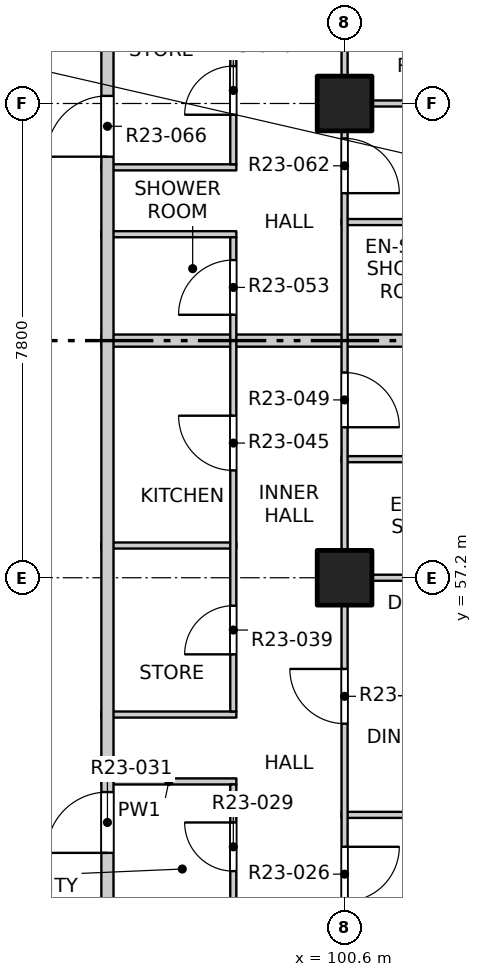
"""IFC4 building model, lengths in metres.
Left out: names, types, materials, properties, quantities, classifications, styles, units other than length and angle.
Written with IfcOpenShell. Run it as: python <this file> out.ifc"""

import sys

from ifc_helpers import new_model, si_unit, direction, frame, frame_2d, origin, origin_2d, place, context, subcontext, project, spatial, rectangle, extrude, element, fill, save


model = new_model("IFC4")
c1 = context("Model", 3, precision=1e-05, world=origin(), true_north=direction((0.0, 1.0)))
c2 = subcontext(c1, "Body", "Model", "MODEL_VIEW")
j1 = project(units=[si_unit("LENGTHUNIT", "METRE"), si_unit("PLANEANGLEUNIT", "RADIAN")], contexts=[c1])
p1 = place(None, origin())
s1 = spatial("IfcSite", under=j1, at=p1, CompositionType="ELEMENT")
p2 = place(p1, origin())
s2 = spatial("IfcBuilding", under=s1, at=p2, CompositionType="ELEMENT")
p3 = place(p2, frame((0.0, 0.0, 238.1)))
s3 = spatial("IfcBuildingStorey", under=s2, at=p3, CompositionType="ELEMENT", Elevation=238.1)
for number, where, z_axis, x_axis in (
    (1, (100.6, 57.2, -0.25), (0.0, 0.0, 1.0), (1.0, 0.0, 0.0)),
    (2, (100.6, 65.0, -0.25), (0.0, 0.0, 1.0), (1.0, 0.0, 0.0)),
):
    element("IfcColumn", number, at=place(p3, frame(where, z_axis=z_axis, x_axis=x_axis)), inside=s3, PredefinedType="COLUMN", context=c2, shape_type="SweptSolid", body=[
        extrude(rectangle(XDim=0.9, YDim=0.9, at=origin_2d()), origin(), (0.0, 0.0, 1.0), 3.35),
    ])
p4 = place(p3, frame((100.55, 53.3, 0.0), z_axis=(0.0, 0.0, 1.0), x_axis=(1.0, 0.0, 0.0)))
e3 = element("IfcWall", 3, at=p4, inside=s3, PredefinedType="PARTITIONING", context=c2, shape_type="SweptSolid", body=[
    extrude(rectangle(XDim=7.55, YDim=0.1, at=frame_2d((3.775, 0.0))), origin(), (0.0, 0.0, 1.0), 3.1),
])
for number, where, z_axis, x_axis in (
    (4, (96.6, 53.85, 0.0), (0.0, 0.0, 1.0), (1.0, 0.0, 0.0)),
    (5, (96.6, 54.95, 0.0), (0.0, 0.0, 1.0), (1.0, 0.0, 0.0)),
):
    element("IfcWall", number, at=place(p3, frame(where, z_axis=z_axis, x_axis=x_axis)), inside=s3, PredefinedType="PARTITIONING", context=c2, shape_type="SweptSolid", body=[
        extrude(rectangle(XDim=2.22, YDim=0.1, at=frame_2d((1.11, 0.0))), origin(), (0.0, 0.0, 1.0), 3.1),
    ])
p5 = place(p3, frame((100.55, 57.2, 0.0), z_axis=(0.0, 0.0, 1.0), x_axis=(1.0, 0.0, 0.0)))
e6 = element("IfcWall", 6, at=p5, inside=s3, PredefinedType="PARTITIONING", context=c2, shape_type="SweptSolid", body=[
    extrude(rectangle(XDim=7.55, YDim=0.1, at=frame_2d((3.775, 0.0))), origin(), (0.0, 0.0, 1.0), 3.1),
])
p6 = place(p3, frame((96.6, 57.73, 0.0), z_axis=(0.0, 0.0, 1.0), x_axis=(1.0, 0.0, 0.0)))
e7 = element("IfcWall", 7, at=p6, inside=s3, PredefinedType="PARTITIONING", context=c2, shape_type="SweptSolid", body=[
    extrude(rectangle(XDim=2.22, YDim=0.1, at=frame_2d((1.11, 0.0))), origin(), (0.0, 0.0, 1.0), 3.1),
])
p7 = place(p3, frame((100.55, 59.15, 0.0), z_axis=(0.0, 0.0, 1.0), x_axis=(1.0, 0.0, 0.0)))
e8 = element("IfcWall", 8, at=p7, inside=s3, PredefinedType="PARTITIONING", context=c2, shape_type="SweptSolid", body=[
    extrude(rectangle(XDim=3.7, YDim=0.1, at=frame_2d((1.85, 0.0))), origin(), (0.0, 0.0, 1.0), 3.1),
])
p8 = place(p3, frame((96.6, 61.1, 0.0), z_axis=(0.0, 0.0, 1.0), x_axis=(1.0, 0.0, 0.0)))
e9 = element("IfcWall", 9, at=p8, inside=s3, PredefinedType="PARTITIONING", context=c2, shape_type="SweptSolid", body=[
    extrude(rectangle(XDim=11.5, YDim=0.2, at=frame_2d((5.75, 0.0))), origin(), (0.0, 0.0, 1.0), 3.1),
])
p9 = place(p3, frame((96.6, 62.85, 0.0), z_axis=(0.0, 0.0, 1.0), x_axis=(1.0, 0.0, 0.0)))
e10 = element("IfcWall", 10, at=p9, inside=s3, PredefinedType="PARTITIONING", context=c2, shape_type="SweptSolid", body=[
    extrude(rectangle(XDim=2.22, YDim=0.1, at=frame_2d((1.11, 0.0))), origin(), (0.0, 0.0, 1.0), 3.1),
])
p10 = place(p3, frame((100.55, 63.05, 0.0), z_axis=(0.0, 0.0, 1.0), x_axis=(1.0, 0.0, 0.0)))
e11 = element("IfcWall", 11, at=p10, inside=s3, PredefinedType="PARTITIONING", context=c2, shape_type="SweptSolid", body=[
    extrude(rectangle(XDim=3.4, YDim=0.1, at=frame_2d((1.7, 0.0))), origin(), (0.0, 0.0, 1.0), 3.1),
])
p11 = place(p3, frame((96.6, 63.95, 0.0), z_axis=(0.0, 0.0, 1.0), x_axis=(1.0, 0.0, 0.0)))
e12 = element("IfcWall", 12, at=p11, inside=s3, PredefinedType="PARTITIONING", context=c2, shape_type="SweptSolid", body=[
    extrude(rectangle(XDim=2.22, YDim=0.1, at=frame_2d((1.11, 0.0))), origin(), (0.0, 0.0, 1.0), 3.1),
])
p12 = place(p3, frame((100.55, 65.0, 0.0), z_axis=(0.0, 0.0, 1.0), x_axis=(1.0, 0.0, 0.0)))
e13 = element("IfcWall", 13, at=p12, inside=s3, PredefinedType="PARTITIONING", context=c2, shape_type="SweptSolid", body=[
    extrude(rectangle(XDim=7.55, YDim=0.1, at=frame_2d((3.775, 0.0))), origin(), (0.0, 0.0, 1.0), 3.1),
])
p13 = place(p3, frame((96.7, 49.5, 0.0), z_axis=(0.0, 0.0, 1.0), x_axis=(0.0, 1.0, 0.0)))
e14 = element("IfcWall", 14, at=p13, inside=s3, PredefinedType="PARTITIONING", context=c2, shape_type="SweptSolid", body=[
    extrude(rectangle(XDim=34.9, YDim=0.2, at=frame_2d((17.45, 0.0))), origin(), (0.0, 0.0, 1.0), 3.1),
])
p14 = place(p13, frame((3.175, 0.0, 0.0)))
e15 = element("IfcOpeningElement", 15, at=p14, cuts=e14, PredefinedType="OPENING", context=c2, shape_type="SweptSolid", body=[
    extrude(rectangle(XDim=1.0, YDim=2.1, at=frame_2d((0.5, 1.05))), frame((0.0, 0.11, 0.0), z_axis=(0.0, -1.0, 0.0), x_axis=(1.0, 0.0, 0.0)), (0.0, 0.0, 1.0), 0.22),
])
p15 = place(p13, frame((14.625, 0.0, 0.0)))
e16 = element("IfcOpeningElement", 16, at=p15, cuts=e14, PredefinedType="OPENING", context=c2, shape_type="SweptSolid", body=[
    extrude(rectangle(XDim=1.0, YDim=2.1, at=frame_2d((0.5, 1.05))), frame((0.0, 0.11, 0.0), z_axis=(0.0, -1.0, 0.0), x_axis=(1.0, 0.0, 0.0)), (0.0, 0.0, 1.0), 0.22),
])
p16 = place(p13, frame((30.175, 0.0, 0.0)))
e17 = element("IfcOpeningElement", 17, at=p16, cuts=e14, PredefinedType="OPENING", context=c2, shape_type="SweptSolid", body=[
    extrude(rectangle(XDim=1.0, YDim=2.1, at=frame_2d((0.5, 1.05))), frame((0.0, 0.11, 0.0), z_axis=(0.0, -1.0, 0.0), x_axis=(1.0, 0.0, 0.0)), (0.0, 0.0, 1.0), 0.22),
])
p17 = place(p3, frame((98.77, 45.55, 0.0), z_axis=(0.0, 0.0, 1.0), x_axis=(0.0, 1.0, 0.0)))
e18 = element("IfcWall", 18, at=p17, inside=s3, PredefinedType="PARTITIONING", context=c2, shape_type="SweptSolid", body=[
    extrude(rectangle(XDim=8.25, YDim=0.1, at=frame_2d((4.125, 0.0))), origin(), (0.0, 0.0, 1.0), 3.1),
])
p18 = place(p17, frame((0.625, 0.0, 0.0)))
e19 = element("IfcOpeningElement", 19, at=p18, cuts=e18, PredefinedType="OPENING", context=c2, shape_type="SweptSolid", body=[
    extrude(rectangle(XDim=0.8, YDim=2.1, at=frame_2d((0.4, 1.05))), frame((0.0, 0.06, 0.0), z_axis=(0.0, -1.0, 0.0), x_axis=(1.0, 0.0, 0.0)), (0.0, 0.0, 1.0), 0.12),
])
p19 = place(p17, frame((2.55, 0.0, 0.0)))
e20 = element("IfcOpeningElement", 20, at=p19, cuts=e18, PredefinedType="OPENING", context=c2, shape_type="SweptSolid", body=[
    extrude(rectangle(XDim=0.9, YDim=2.1, at=frame_2d((0.45, 1.05))), frame((0.0, 0.06, 0.0), z_axis=(0.0, -1.0, 0.0), x_axis=(1.0, 0.0, 0.0)), (0.0, 0.0, 1.0), 0.12),
])
p20 = place(p17, frame((4.575, 0.0, 0.0)))
e21 = element("IfcOpeningElement", 21, at=p20, cuts=e18, PredefinedType="OPENING", context=c2, shape_type="SweptSolid", body=[
    extrude(rectangle(XDim=0.9, YDim=2.1, at=frame_2d((0.45, 1.05))), frame((0.0, 0.06, 0.0), z_axis=(0.0, -1.0, 0.0), x_axis=(1.0, 0.0, 0.0)), (0.0, 0.0, 1.0), 0.12),
])
p21 = place(p17, frame((6.825, 0.0, 0.0)))
e22 = element("IfcOpeningElement", 22, at=p21, cuts=e18, PredefinedType="OPENING", context=c2, shape_type="SweptSolid", body=[
    extrude(rectangle(XDim=0.8, YDim=2.1, at=frame_2d((0.4, 1.05))), frame((0.0, 0.06, 0.0), z_axis=(0.0, -1.0, 0.0), x_axis=(1.0, 0.0, 0.0)), (0.0, 0.0, 1.0), 0.12),
])
p22 = place(p3, frame((98.77, 55.0, 0.0), z_axis=(0.0, 0.0, 1.0), x_axis=(0.0, 1.0, 0.0)))
e23 = element("IfcWall", 23, at=p22, inside=s3, PredefinedType="PARTITIONING", context=c2, shape_type="SweptSolid", body=[
    extrude(rectangle(XDim=7.8, YDim=0.1, at=frame_2d((3.9, 0.0))), origin(), (0.0, 0.0, 1.0), 3.1),
])
p23 = place(p22, frame((0.94, 0.0, 0.0)))
e24 = element("IfcOpeningElement", 24, at=p23, cuts=e23, PredefinedType="OPENING", context=c2, shape_type="SweptSolid", body=[
    extrude(rectangle(XDim=0.8, YDim=2.1, at=frame_2d((0.4, 1.05))), frame((0.0, 0.06, 0.0), z_axis=(0.0, -1.0, 0.0), x_axis=(1.0, 0.0, 0.0)), (0.0, 0.0, 1.0), 0.12),
])
p24 = place(p22, frame((3.965, 0.0, 0.0)))
e25 = element("IfcOpeningElement", 25, at=p24, cuts=e23, PredefinedType="OPENING", context=c2, shape_type="SweptSolid", body=[
    extrude(rectangle(XDim=0.9, YDim=2.1, at=frame_2d((0.45, 1.05))), frame((0.0, 0.06, 0.0), z_axis=(0.0, -1.0, 0.0), x_axis=(1.0, 0.0, 0.0)), (0.0, 0.0, 1.0), 0.12),
])
p25 = place(p22, frame((6.525, 0.0, 0.0)))
e26 = element("IfcOpeningElement", 26, at=p25, cuts=e23, PredefinedType="OPENING", context=c2, shape_type="SweptSolid", body=[
    extrude(rectangle(XDim=0.9, YDim=2.1, at=frame_2d((0.45, 1.05))), frame((0.0, 0.06, 0.0), z_axis=(0.0, -1.0, 0.0), x_axis=(1.0, 0.0, 0.0)), (0.0, 0.0, 1.0), 0.12),
])
p26 = place(p3, frame((98.77, 64.0, 0.0), z_axis=(0.0, 0.0, 1.0), x_axis=(0.0, 1.0, 0.0)))
e27 = element("IfcWall", 27, at=p26, inside=s3, PredefinedType="PARTITIONING", context=c2, shape_type="SweptSolid", body=[
    extrude(rectangle(XDim=14.35, YDim=0.1, at=frame_2d((7.175, 0.0))), origin(), (0.0, 0.0, 1.0), 3.1),
])
p27 = place(p26, frame((0.815, 0.0, 0.0)))
e28 = element("IfcOpeningElement", 28, at=p27, cuts=e27, PredefinedType="OPENING", context=c2, shape_type="SweptSolid", body=[
    extrude(rectangle(XDim=0.8, YDim=2.1, at=frame_2d((0.4, 1.05))), frame((0.0, 0.06, 0.0), z_axis=(0.0, -1.0, 0.0), x_axis=(1.0, 0.0, 0.0)), (0.0, 0.0, 1.0), 0.12),
])
p28 = place(p26, frame((3.23, 0.0, 0.0)))
e29 = element("IfcOpeningElement", 29, at=p28, cuts=e27, PredefinedType="OPENING", context=c2, shape_type="SweptSolid", body=[
    extrude(rectangle(XDim=0.9, YDim=2.1, at=frame_2d((0.45, 1.05))), frame((0.0, 0.06, 0.0), z_axis=(0.0, -1.0, 0.0), x_axis=(1.0, 0.0, 0.0)), (0.0, 0.0, 1.0), 0.12),
])
p29 = place(p26, frame((5.63, 0.0, 0.0)))
e30 = element("IfcOpeningElement", 30, at=p29, cuts=e27, PredefinedType="OPENING", context=c2, shape_type="SweptSolid", body=[
    extrude(rectangle(XDim=0.8, YDim=2.1, at=frame_2d((0.4, 1.05))), frame((0.0, 0.06, 0.0), z_axis=(0.0, -1.0, 0.0), x_axis=(1.0, 0.0, 0.0)), (0.0, 0.0, 1.0), 0.12),
])
p30 = place(p26, frame((8.265, 0.0, 0.0)))
e31 = element("IfcOpeningElement", 31, at=p30, cuts=e27, PredefinedType="OPENING", context=c2, shape_type="SweptSolid", body=[
    extrude(rectangle(XDim=0.9, YDim=2.1, at=frame_2d((0.45, 1.05))), frame((0.0, 0.06, 0.0), z_axis=(0.0, -1.0, 0.0), x_axis=(1.0, 0.0, 0.0)), (0.0, 0.0, 1.0), 0.12),
])
p31 = place(p26, frame((11.075, 0.0, 0.0)))
e32 = element("IfcOpeningElement", 32, at=p31, cuts=e27, PredefinedType="OPENING", context=c2, shape_type="SweptSolid", body=[
    extrude(rectangle(XDim=0.8, YDim=2.1, at=frame_2d((0.4, 1.05))), frame((0.0, 0.06, 0.0), z_axis=(0.0, -1.0, 0.0), x_axis=(1.0, 0.0, 0.0)), (0.0, 0.0, 1.0), 0.12),
])
p32 = place(p26, frame((13.15, 0.0, 0.0)))
e33 = element("IfcOpeningElement", 33, at=p32, cuts=e27, PredefinedType="OPENING", context=c2, shape_type="SweptSolid", body=[
    extrude(rectangle(XDim=0.8, YDim=2.1, at=frame_2d((0.4, 1.05))), frame((0.0, 0.06, 0.0), z_axis=(0.0, -1.0, 0.0), x_axis=(1.0, 0.0, 0.0)), (0.0, 0.0, 1.0), 0.12),
])
p33 = place(p3, frame((100.6, 41.9, 0.0), z_axis=(0.0, 0.0, 1.0), x_axis=(0.0, 1.0, 0.0)))
e34 = element("IfcWall", 34, at=p33, inside=s3, PredefinedType="PARTITIONING", context=c2, shape_type="SweptSolid", body=[
    extrude(rectangle(XDim=46.2, YDim=0.1, at=frame_2d((23.1, 0.0))), origin(), (0.0, 0.0, 1.0), 3.1),
])
p34 = place(p33, frame((1.2, 0.0, 0.0)))
e35 = element("IfcOpeningElement", 35, at=p34, cuts=e34, PredefinedType="OPENING", context=c2, shape_type="SweptSolid", body=[
    extrude(rectangle(XDim=0.9, YDim=2.1, at=frame_2d((0.45, 1.05))), frame((0.0, 0.06, 0.0), z_axis=(0.0, -1.0, 0.0), x_axis=(1.0, 0.0, 0.0)), (0.0, 0.0, 1.0), 0.12),
])
p35 = place(p33, frame((6.025, 0.0, 0.0)))
e36 = element("IfcOpeningElement", 36, at=p35, cuts=e34, PredefinedType="OPENING", context=c2, shape_type="SweptSolid", body=[
    extrude(rectangle(XDim=0.9, YDim=2.1, at=frame_2d((0.45, 1.05))), frame((0.0, 0.06, 0.0), z_axis=(0.0, -1.0, 0.0), x_axis=(1.0, 0.0, 0.0)), (0.0, 0.0, 1.0), 0.12),
])
p36 = place(p33, frame((9.975, 0.0, 0.0)))
e37 = element("IfcOpeningElement", 37, at=p36, cuts=e34, PredefinedType="OPENING", context=c2, shape_type="SweptSolid", body=[
    extrude(rectangle(XDim=0.9, YDim=2.1, at=frame_2d((0.45, 1.05))), frame((0.0, 0.06, 0.0), z_axis=(0.0, -1.0, 0.0), x_axis=(1.0, 0.0, 0.0)), (0.0, 0.0, 1.0), 0.12),
])
p37 = place(p33, frame((12.9, 0.0, 0.0)))
e38 = element("IfcOpeningElement", 38, at=p37, cuts=e34, PredefinedType="OPENING", context=c2, shape_type="SweptSolid", body=[
    extrude(rectangle(XDim=0.9, YDim=2.1, at=frame_2d((0.45, 1.05))), frame((0.0, 0.06, 0.0), z_axis=(0.0, -1.0, 0.0), x_axis=(1.0, 0.0, 0.0)), (0.0, 0.0, 1.0), 0.12),
])
p38 = place(p33, frame((17.775, 0.0, 0.0)))
e39 = element("IfcOpeningElement", 39, at=p38, cuts=e34, PredefinedType="OPENING", context=c2, shape_type="SweptSolid", body=[
    extrude(rectangle(XDim=0.9, YDim=2.1, at=frame_2d((0.45, 1.05))), frame((0.0, 0.06, 0.0), z_axis=(0.0, -1.0, 0.0), x_axis=(1.0, 0.0, 0.0)), (0.0, 0.0, 1.0), 0.12),
])
p39 = place(p33, frame((21.625, 0.0, 0.0)))
e40 = element("IfcOpeningElement", 40, at=p39, cuts=e34, PredefinedType="OPENING", context=c2, shape_type="SweptSolid", body=[
    extrude(rectangle(XDim=0.9, YDim=2.1, at=frame_2d((0.45, 1.05))), frame((0.0, 0.06, 0.0), z_axis=(0.0, -1.0, 0.0), x_axis=(1.0, 0.0, 0.0)), (0.0, 0.0, 1.0), 0.12),
])
p40 = place(p33, frame((25.575, 0.0, 0.0)))
e41 = element("IfcOpeningElement", 41, at=p40, cuts=e34, PredefinedType="OPENING", context=c2, shape_type="SweptSolid", body=[
    extrude(rectangle(XDim=0.9, YDim=2.1, at=frame_2d((0.45, 1.05))), frame((0.0, 0.06, 0.0), z_axis=(0.0, -1.0, 0.0), x_axis=(1.0, 0.0, 0.0)), (0.0, 0.0, 1.0), 0.12),
])
p41 = place(p33, frame((28.5, 0.0, 0.0)))
e42 = element("IfcOpeningElement", 42, at=p41, cuts=e34, PredefinedType="OPENING", context=c2, shape_type="SweptSolid", body=[
    extrude(rectangle(XDim=0.9, YDim=2.1, at=frame_2d((0.45, 1.05))), frame((0.0, 0.06, 0.0), z_axis=(0.0, -1.0, 0.0), x_axis=(1.0, 0.0, 0.0)), (0.0, 0.0, 1.0), 0.12),
])
p42 = place(p33, frame((33.375, 0.0, 0.0)))
e43 = element("IfcOpeningElement", 43, at=p42, cuts=e34, PredefinedType="OPENING", context=c2, shape_type="SweptSolid", body=[
    extrude(rectangle(XDim=0.9, YDim=2.1, at=frame_2d((0.45, 1.05))), frame((0.0, 0.06, 0.0), z_axis=(0.0, -1.0, 0.0), x_axis=(1.0, 0.0, 0.0)), (0.0, 0.0, 1.0), 0.12),
])
p43 = place(p33, frame((36.3, 0.0, 0.0)))
e44 = element("IfcOpeningElement", 44, at=p43, cuts=e34, PredefinedType="OPENING", context=c2, shape_type="SweptSolid", body=[
    extrude(rectangle(XDim=0.9, YDim=2.1, at=frame_2d((0.45, 1.05))), frame((0.0, 0.06, 0.0), z_axis=(0.0, -1.0, 0.0), x_axis=(1.0, 0.0, 0.0)), (0.0, 0.0, 1.0), 0.12),
])
p44 = place(p33, frame((40.2, 0.0, 0.0)))
e45 = element("IfcOpeningElement", 45, at=p44, cuts=e34, PredefinedType="OPENING", context=c2, shape_type="SweptSolid", body=[
    extrude(rectangle(XDim=0.9, YDim=2.1, at=frame_2d((0.45, 1.05))), frame((0.0, 0.06, 0.0), z_axis=(0.0, -1.0, 0.0), x_axis=(1.0, 0.0, 0.0)), (0.0, 0.0, 1.0), 0.12),
])
p45 = place(p33, frame((44.1, 0.0, 0.0)))
e46 = element("IfcOpeningElement", 46, at=p45, cuts=e34, PredefinedType="OPENING", context=c2, shape_type="SweptSolid", body=[
    extrude(rectangle(XDim=0.9, YDim=2.1, at=frame_2d((0.45, 1.05))), frame((0.0, 0.06, 0.0), z_axis=(0.0, -1.0, 0.0), x_axis=(1.0, 0.0, 0.0)), (0.0, 0.0, 1.0), 0.12),
])
p46 = place(p36, origin())
e47 = element("IfcDoor", 47, at=p46, inside=s3, OperationType="SINGLE_SWING_LEFT", PredefinedType="DOOR", context=c2, shape_type="SweptSolid", body=[
    extrude(rectangle(XDim=0.9, YDim=2.1, at=frame_2d((0.45, 1.05))), frame((0.0, 0.025, 0.0), z_axis=(0.0, -1.0, 0.0), x_axis=(1.0, 0.0, 0.0)), (0.0, 0.0, 1.0), 0.05),
])
fill(e37, e47)
p47 = place(p21, origin())
e48 = element("IfcDoor", 48, at=p47, inside=s3, OperationType="SINGLE_SWING_RIGHT", PredefinedType="DOOR", context=c2, shape_type="SweptSolid", body=[
    extrude(rectangle(XDim=0.8, YDim=2.1, at=frame_2d((0.4, 1.05))), frame((0.0, 0.025, 0.0), z_axis=(0.0, -1.0, 0.0), x_axis=(1.0, 0.0, 0.0)), (0.0, 0.0, 1.0), 0.05),
])
fill(e22, e48)
p48 = place(p14, origin())
e49 = element("IfcDoor", 49, at=p48, inside=s3, OperationType="SINGLE_SWING_RIGHT", PredefinedType="DOOR", context=c2, shape_type="SweptSolid", body=[
    extrude(rectangle(XDim=1.0, YDim=2.1, at=frame_2d((0.5, 1.05))), frame((0.0, 0.025, 0.0), z_axis=(0.0, -1.0, 0.0), x_axis=(1.0, 0.0, 0.0)), (0.0, 0.0, 1.0), 0.05),
])
fill(e15, e49)
p49 = place(p37, origin())
e50 = element("IfcDoor", 50, at=p49, inside=s3, OperationType="SINGLE_SWING_RIGHT", PredefinedType="DOOR", context=c2, shape_type="SweptSolid", body=[
    extrude(rectangle(XDim=0.9, YDim=2.1, at=frame_2d((0.45, 1.05))), frame((0.0, 0.025, 0.0), z_axis=(0.0, -1.0, 0.0), x_axis=(1.0, 0.0, 0.0)), (0.0, 0.0, 1.0), 0.05),
])
fill(e38, e50)
p50 = place(p23, origin())
e51 = element("IfcDoor", 51, at=p50, inside=s3, OperationType="SINGLE_SWING_LEFT", PredefinedType="DOOR", context=c2, shape_type="SweptSolid", body=[
    extrude(rectangle(XDim=0.8, YDim=2.1, at=frame_2d((0.4, 1.05))), frame((0.0, 0.025, 0.0), z_axis=(0.0, -1.0, 0.0), x_axis=(1.0, 0.0, 0.0)), (0.0, 0.0, 1.0), 0.05),
])
fill(e24, e51)
p51 = place(p24, origin())
e52 = element("IfcDoor", 52, at=p51, inside=s3, OperationType="SINGLE_SWING_RIGHT", PredefinedType="DOOR", context=c2, shape_type="SweptSolid", body=[
    extrude(rectangle(XDim=0.9, YDim=2.1, at=frame_2d((0.45, 1.05))), frame((0.0, 0.025, 0.0), z_axis=(0.0, -1.0, 0.0), x_axis=(1.0, 0.0, 0.0)), (0.0, 0.0, 1.0), 0.05),
])
fill(e25, e52)
p52 = place(p38, origin())
e53 = element("IfcDoor", 53, at=p52, inside=s3, OperationType="SINGLE_SWING_RIGHT", PredefinedType="DOOR", context=c2, shape_type="SweptSolid", body=[
    extrude(rectangle(XDim=0.9, YDim=2.1, at=frame_2d((0.45, 1.05))), frame((0.0, 0.025, 0.0), z_axis=(0.0, -1.0, 0.0), x_axis=(1.0, 0.0, 0.0)), (0.0, 0.0, 1.0), 0.05),
])
fill(e39, e53)
p53 = place(p25, origin())
e54 = element("IfcDoor", 54, at=p53, inside=s3, OperationType="SINGLE_SWING_LEFT", PredefinedType="DOOR", context=c2, shape_type="SweptSolid", body=[
    extrude(rectangle(XDim=0.9, YDim=2.1, at=frame_2d((0.45, 1.05))), frame((0.0, 0.025, 0.0), z_axis=(0.0, -1.0, 0.0), x_axis=(1.0, 0.0, 0.0)), (0.0, 0.0, 1.0), 0.05),
])
fill(e26, e54)
p54 = place(p39, origin())
e55 = element("IfcDoor", 55, at=p54, inside=s3, OperationType="SINGLE_SWING_RIGHT", PredefinedType="DOOR", context=c2, shape_type="SweptSolid", body=[
    extrude(rectangle(XDim=0.9, YDim=2.1, at=frame_2d((0.45, 1.05))), frame((0.0, 0.025, 0.0), z_axis=(0.0, -1.0, 0.0), x_axis=(1.0, 0.0, 0.0)), (0.0, 0.0, 1.0), 0.05),
])
fill(e40, e55)
p55 = place(p15, origin())
e56 = element("IfcDoor", 56, at=p55, inside=s3, OperationType="SINGLE_SWING_LEFT", PredefinedType="DOOR", context=c2, shape_type="SweptSolid", body=[
    extrude(rectangle(XDim=1.0, YDim=2.1, at=frame_2d((0.5, 1.05))), frame((0.0, 0.025, 0.0), z_axis=(0.0, -1.0, 0.0), x_axis=(1.0, 0.0, 0.0)), (0.0, 0.0, 1.0), 0.05),
])
fill(e16, e56)
p56 = place(p27, origin())
e57 = element("IfcDoor", 57, at=p56, inside=s3, OperationType="SINGLE_SWING_LEFT", PredefinedType="DOOR", context=c2, shape_type="SweptSolid", body=[
    extrude(rectangle(XDim=0.8, YDim=2.1, at=frame_2d((0.4, 1.05))), frame((0.0, 0.025, 0.0), z_axis=(0.0, -1.0, 0.0), x_axis=(1.0, 0.0, 0.0)), (0.0, 0.0, 1.0), 0.05),
])
fill(e28, e57)
save(model, sys.argv[1])
